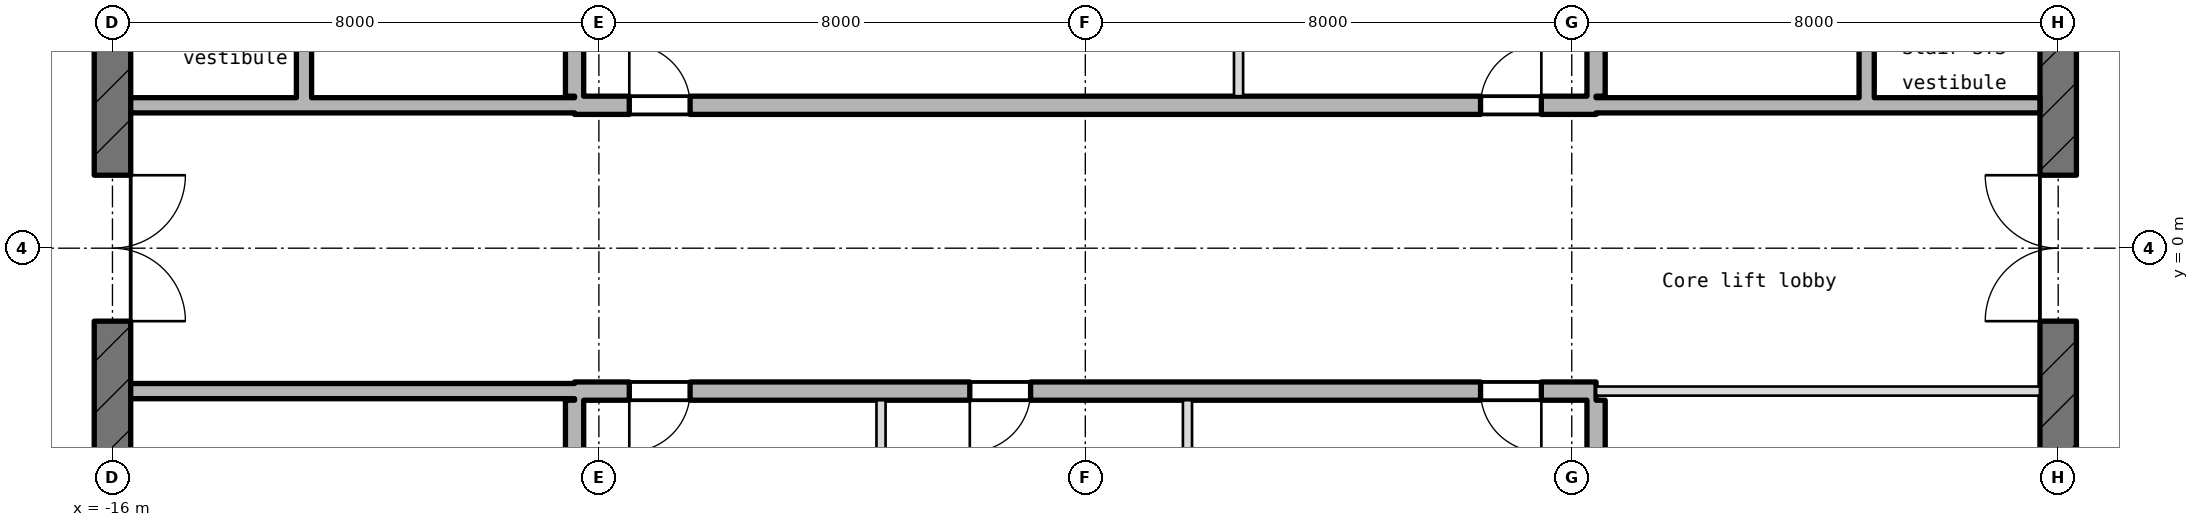
"""IFC4 building model, lengths in metres.
Left out: names, types, materials, properties, quantities, classifications, styles, units other than length and angle.
Written with IfcOpenShell. Run it as: python <this file> out.ifc"""

import sys

from ifc_helpers import new_model, si_unit, direction, frame, frame_2d, origin, place, context, subcontext, project, spatial, rectangle, extrude, element, fill, save


model = new_model("IFC4")
c1 = context("Model", 3, precision=1e-05, world=origin(), true_north=direction((0.0, 1.0)))
c2 = subcontext(c1, "Body", "Model", "MODEL_VIEW")
j1 = project(units=[si_unit("LENGTHUNIT", "METRE"), si_unit("PLANEANGLEUNIT", "RADIAN")], contexts=[c1])
p1 = place(None, origin())
s1 = spatial("IfcSite", under=j1, at=p1, CompositionType="ELEMENT")
p2 = place(p1, origin())
s2 = spatial("IfcBuilding", under=s1, at=p2, CompositionType="ELEMENT")
p3 = place(p2, frame((0.0, 0.0, 418.55)))
s3 = spatial("IfcBuildingStorey", under=s2, at=p3, CompositionType="ELEMENT", Elevation=418.55)
p4 = place(p3, frame((16.0, -10.124, -0.2), z_axis=(0.0, 0.0, 1.0), x_axis=(0.0, 1.0, 0.0)))
e1 = element("IfcWall", 1, at=p4, inside=s3, PredefinedType="SHEAR", context=c2, shape_type="SweptSolid", body=[
    extrude(rectangle(XDim=20.249, YDim=0.6, at=frame_2d((10.124, 0.0))), origin(), (0.0, 0.0, 1.0), 4.9),
])
p5 = place(p4, frame((8.924, 0.0, 0.2)))
e2 = element("IfcOpeningElement", 2, at=p5, cuts=e1, PredefinedType="OPENING", context=c2, shape_type="SweptSolid", body=[
    extrude(rectangle(XDim=2.4, YDim=2.1, at=frame_2d((1.2, 1.05))), frame((0.0, 0.31, 0.0), z_axis=(0.0, -1.0, 0.0), x_axis=(1.0, 0.0, 0.0)), (0.0, 0.0, 1.0), 0.62),
])
p6 = place(p4, frame((13.524, 0.0, 0.2)))
e3 = element("IfcOpeningElement", 3, at=p6, cuts=e1, PredefinedType="OPENING", context=c2, shape_type="SweptSolid", body=[
    extrude(rectangle(XDim=1.2, YDim=2.1, at=frame_2d((0.6, 1.05))), frame((0.0, 0.31, 0.0), z_axis=(0.0, -1.0, 0.0), x_axis=(1.0, 0.0, 0.0)), (0.0, 0.0, 1.0), 0.62),
])
p7 = place(p4, frame((2.4, 0.0, 0.2)))
e4 = element("IfcOpeningElement", 4, at=p7, cuts=e1, PredefinedType="OPENING", context=c2, shape_type="SweptSolid", body=[
    extrude(rectangle(XDim=1.2, YDim=2.1, at=frame_2d((0.6, 1.05))), frame((0.0, 0.31, 0.0), z_axis=(0.0, -1.0, 0.0), x_axis=(1.0, 0.0, 0.0)), (0.0, 0.0, 1.0), 0.62),
])
p8 = place(p3, frame((-16.0, 10.124, -0.2), z_axis=(0.0, 0.0, 1.0), x_axis=(0.0, -1.0, 0.0)))
e5 = element("IfcWall", 5, at=p8, inside=s3, PredefinedType="SHEAR", context=c2, shape_type="SweptSolid", body=[
    extrude(rectangle(XDim=20.249, YDim=0.6, at=frame_2d((10.124, 0.0))), origin(), (0.0, 0.0, 1.0), 4.9),
])
p9 = place(p8, frame((8.924, 0.0, 0.2)))
e6 = element("IfcOpeningElement", 6, at=p9, cuts=e5, PredefinedType="OPENING", context=c2, shape_type="SweptSolid", body=[
    extrude(rectangle(XDim=2.4, YDim=2.1, at=frame_2d((1.2, 1.05))), frame((0.0, 0.31, 0.0), z_axis=(0.0, -1.0, 0.0), x_axis=(1.0, 0.0, 0.0)), (0.0, 0.0, 1.0), 0.62),
])
p10 = place(p8, frame((5.524, 0.0, 0.2)))
e7 = element("IfcOpeningElement", 7, at=p10, cuts=e5, PredefinedType="OPENING", context=c2, shape_type="SweptSolid", body=[
    extrude(rectangle(XDim=1.2, YDim=2.1, at=frame_2d((0.6, 1.05))), frame((0.0, 0.31, 0.0), z_axis=(0.0, -1.0, 0.0), x_axis=(1.0, 0.0, 0.0)), (0.0, 0.0, 1.0), 0.62),
])
p11 = place(p3, frame((-15.7, -2.35, 0.0), z_axis=(0.0, 0.0, 1.0), x_axis=(1.0, 0.0, 0.0)))
e8 = element("IfcWall", 8, at=p11, inside=s3, PredefinedType="STANDARD", context=c2, shape_type="SweptSolid", body=[
    extrude(rectangle(XDim=7.3, YDim=0.25, at=frame_2d((3.65, 0.0))), origin(), (0.0, 0.0, 1.0), 4.7),
])
p12 = place(p3, frame((-8.4, -2.35, -0.2), z_axis=(0.0, 0.0, 1.0), x_axis=(1.0, 0.0, 0.0)))
e9 = element("IfcWall", 9, at=p12, inside=s3, PredefinedType="SHEAR", context=c2, shape_type="SweptSolid", body=[
    extrude(rectangle(XDim=16.8, YDim=0.3, at=frame_2d((8.4, 0.0))), origin(), (0.0, 0.0, 1.0), 4.9),
])
p13 = place(p12, frame((0.9, 0.0, 0.2)))
e10 = element("IfcOpeningElement", 10, at=p13, cuts=e9, PredefinedType="OPENING", context=c2, shape_type="SweptSolid", body=[
    extrude(rectangle(XDim=1.0, YDim=2.1, at=frame_2d((0.5, 1.05))), frame((0.0, 0.16, 0.0), z_axis=(0.0, -1.0, 0.0), x_axis=(1.0, 0.0, 0.0)), (0.0, 0.0, 1.0), 0.32),
])
p14 = place(p12, frame((6.5, 0.0, 0.2)))
e11 = element("IfcOpeningElement", 11, at=p14, cuts=e9, PredefinedType="OPENING", context=c2, shape_type="SweptSolid", body=[
    extrude(rectangle(XDim=1.0, YDim=2.1, at=frame_2d((0.5, 1.05))), frame((0.0, 0.16, 0.0), z_axis=(0.0, -1.0, 0.0), x_axis=(1.0, 0.0, 0.0)), (0.0, 0.0, 1.0), 0.32),
])
p15 = place(p12, frame((14.9, 0.0, 0.2)))
e12 = element("IfcOpeningElement", 12, at=p15, cuts=e9, PredefinedType="OPENING", context=c2, shape_type="SweptSolid", body=[
    extrude(rectangle(XDim=1.0, YDim=2.1, at=frame_2d((0.5, 1.05))), frame((0.0, 0.16, 0.0), z_axis=(0.0, -1.0, 0.0), x_axis=(1.0, 0.0, 0.0)), (0.0, 0.0, 1.0), 0.32),
])
p16 = place(p3, frame((8.4, -2.35, 0.0), z_axis=(0.0, 0.0, 1.0), x_axis=(1.0, 0.0, 0.0)))
e13 = element("IfcWall", 13, at=p16, inside=s3, PredefinedType="PARTITIONING", context=c2, shape_type="SweptSolid", body=[
    extrude(rectangle(XDim=7.3, YDim=0.15, at=frame_2d((3.65, 0.0))), origin(), (0.0, 0.0, 1.0), 4.7),
])
p17 = place(p3, frame((-15.7, 2.35, 0.0), z_axis=(0.0, 0.0, 1.0), x_axis=(1.0, 0.0, 0.0)))
e14 = element("IfcWall", 14, at=p17, inside=s3, PredefinedType="STANDARD", context=c2, shape_type="SweptSolid", body=[
    extrude(rectangle(XDim=7.3, YDim=0.25, at=frame_2d((3.65, 0.0))), origin(), (0.0, 0.0, 1.0), 4.7),
])
p18 = place(p3, frame((-8.4, 2.35, -0.2), z_axis=(0.0, 0.0, 1.0), x_axis=(1.0, 0.0, 0.0)))
e15 = element("IfcWall", 15, at=p18, inside=s3, PredefinedType="SHEAR", context=c2, shape_type="SweptSolid", body=[
    extrude(rectangle(XDim=16.8, YDim=0.3, at=frame_2d((8.4, 0.0))), origin(), (0.0, 0.0, 1.0), 4.9),
])
p19 = place(p18, frame((0.9, 0.0, 0.2)))
e16 = element("IfcOpeningElement", 16, at=p19, cuts=e15, PredefinedType="OPENING", context=c2, shape_type="SweptSolid", body=[
    extrude(rectangle(XDim=1.0, YDim=2.1, at=frame_2d((0.5, 1.05))), frame((0.0, 0.16, 0.0), z_axis=(0.0, -1.0, 0.0), x_axis=(1.0, 0.0, 0.0)), (0.0, 0.0, 1.0), 0.32),
])
p20 = place(p18, frame((14.9, 0.0, 0.2)))
e17 = element("IfcOpeningElement", 17, at=p20, cuts=e15, PredefinedType="OPENING", context=c2, shape_type="SweptSolid", body=[
    extrude(rectangle(XDim=1.0, YDim=2.1, at=frame_2d((0.5, 1.05))), frame((0.0, 0.16, 0.0), z_axis=(0.0, -1.0, 0.0), x_axis=(1.0, 0.0, 0.0)), (0.0, 0.0, 1.0), 0.32),
])
p21 = place(p3, frame((8.4, 2.35, 0.0), z_axis=(0.0, 0.0, 1.0), x_axis=(1.0, 0.0, 0.0)))
e18 = element("IfcWall", 18, at=p21, inside=s3, PredefinedType="STANDARD", context=c2, shape_type="SweptSolid", body=[
    extrude(rectangle(XDim=7.3, YDim=0.25, at=frame_2d((3.65, 0.0))), origin(), (0.0, 0.0, 1.0), 4.7),
])
p22 = place(p3, frame((-12.85, 2.475, 0.0), z_axis=(0.0, 0.0, 1.0), x_axis=(0.0, 1.0, 0.0)))
e19 = element("IfcWall", 19, at=p22, inside=s3, PredefinedType="STANDARD", context=c2, shape_type="SweptSolid", body=[
    extrude(rectangle(XDim=3.05, YDim=0.25, at=frame_2d((1.525, 0.0))), origin(), (0.0, 0.0, 1.0), 4.7),
])
p23 = place(p3, frame((-8.4, -8.75, -0.2), z_axis=(0.0, 0.0, 1.0), x_axis=(0.0, 1.0, 0.0)))
e20 = element("IfcWall", 20, at=p23, inside=s3, PredefinedType="SHEAR", context=c2, shape_type="SweptSolid", body=[
    extrude(rectangle(XDim=6.25, YDim=0.3, at=frame_2d((3.125, 0.0))), origin(), (0.0, 0.0, 1.0), 4.9),
])
p24 = place(p3, frame((-8.4, 2.5, -0.2), z_axis=(0.0, 0.0, 1.0), x_axis=(0.0, 1.0, 0.0)))
e21 = element("IfcWall", 21, at=p24, inside=s3, PredefinedType="SHEAR", context=c2, shape_type="SweptSolid", body=[
    extrude(rectangle(XDim=5.85, YDim=0.3, at=frame_2d((2.925, 0.0))), origin(), (0.0, 0.0, 1.0), 4.9),
])
for number, where, z_axis, x_axis in (
    (22, (-3.36, -5.24, 0.0), (0.0, 0.0, 1.0), (0.0, 1.0, 0.0)),
    (23, (1.68, -5.24, 0.0), (0.0, 0.0, 1.0), (0.0, 1.0, 0.0)),
):
    element("IfcWall", number, at=place(p3, frame(where, z_axis=z_axis, x_axis=x_axis)), inside=s3, PredefinedType="PARTITIONING", context=c2, shape_type="SweptSolid", body=[
        extrude(rectangle(XDim=2.74, YDim=0.15, at=frame_2d((1.37, 0.0))), origin(), (0.0, 0.0, 1.0), 4.7),
    ])
p25 = place(p3, frame((2.52, 2.5, 0.0), z_axis=(0.0, 0.0, 1.0), x_axis=(0.0, 1.0, 0.0)))
e24 = element("IfcWall", 24, at=p25, inside=s3, PredefinedType="PARTITIONING", context=c2, shape_type="SweptSolid", body=[
    extrude(rectangle(XDim=2.775, YDim=0.15, at=frame_2d((1.387, 0.0))), origin(), (0.0, 0.0, 1.0), 4.7),
])
for number, where, z_axis, x_axis in (
    (25, (8.4, -8.35, -0.2), (0.0, 0.0, 1.0), (0.0, 1.0, 0.0)),
    (26, (8.4, 2.5, -0.2), (0.0, 0.0, 1.0), (0.0, 1.0, 0.0)),
):
    element("IfcWall", number, at=place(p3, frame(where, z_axis=z_axis, x_axis=x_axis)), inside=s3, PredefinedType="SHEAR", context=c2, shape_type="SweptSolid", body=[
        extrude(rectangle(XDim=5.85, YDim=0.3, at=frame_2d((2.925, 0.0))), origin(), (0.0, 0.0, 1.0), 4.9),
    ])
p26 = place(p3, frame((12.85, 2.475, 0.0), z_axis=(0.0, 0.0, 1.0), x_axis=(0.0, 1.0, 0.0)))
e27 = element("IfcWall", 27, at=p26, inside=s3, PredefinedType="STANDARD", context=c2, shape_type="SweptSolid", body=[
    extrude(rectangle(XDim=3.05, YDim=0.25, at=frame_2d((1.525, 0.0))), origin(), (0.0, 0.0, 1.0), 4.7),
])
p27 = place(p9, origin())
e28 = element("IfcDoor", 28, at=p27, inside=s3, OperationType="DOUBLE_DOOR_SINGLE_SWING", PredefinedType="DOOR", context=c2, shape_type="SweptSolid", body=[
    extrude(rectangle(XDim=2.4, YDim=2.1, at=frame_2d((1.2, 1.05))), frame((0.0, 0.025, 0.0), z_axis=(0.0, -1.0, 0.0), x_axis=(1.0, 0.0, 0.0)), (0.0, 0.0, 1.0), 0.05),
])
fill(e6, e28)
p28 = place(p5, origin())
e29 = element("IfcDoor", 29, at=p28, inside=s3, OperationType="DOUBLE_DOOR_SINGLE_SWING", PredefinedType="DOOR", context=c2, shape_type="SweptSolid", body=[
    extrude(rectangle(XDim=2.4, YDim=2.1, at=frame_2d((1.2, 1.05))), frame((0.0, 0.025, 0.0), z_axis=(0.0, -1.0, 0.0), x_axis=(1.0, 0.0, 0.0)), (0.0, 0.0, 1.0), 0.05),
])
fill(e2, e29)
p29 = place(p19, origin())
e30 = element("IfcDoor", 30, at=p29, inside=s3, OperationType="SINGLE_SWING_RIGHT", PredefinedType="DOOR", context=c2, shape_type="SweptSolid", body=[
    extrude(rectangle(XDim=1.0, YDim=2.1, at=frame_2d((0.5, 1.05))), frame((0.0, 0.025, 0.0), z_axis=(0.0, -1.0, 0.0), x_axis=(1.0, 0.0, 0.0)), (0.0, 0.0, 1.0), 0.05),
])
fill(e16, e30)
p30 = place(p20, origin())
e31 = element("IfcDoor", 31, at=p30, inside=s3, OperationType="SINGLE_SWING_RIGHT", PredefinedType="DOOR", context=c2, shape_type="SweptSolid", body=[
    extrude(rectangle(XDim=1.0, YDim=2.1, at=frame_2d((0.5, 1.05))), frame((0.0, 0.025, 0.0), z_axis=(0.0, -1.0, 0.0), x_axis=(1.0, 0.0, 0.0)), (0.0, 0.0, 1.0), 0.05),
])
fill(e17, e31)
p31 = place(p13, frame((1.0, 0.0, 0.0), z_axis=(0.0, 0.0, 1.0), x_axis=(-1.0, 0.0, 0.0)))
e32 = element("IfcDoor", 32, at=p31, inside=s3, OperationType="SINGLE_SWING_LEFT", PredefinedType="DOOR", context=c2, shape_type="SweptSolid", body=[
    extrude(rectangle(XDim=1.0, YDim=2.1, at=frame_2d((0.5, 1.05))), frame((0.0, 0.025, 0.0), z_axis=(0.0, -1.0, 0.0), x_axis=(1.0, 0.0, 0.0)), (0.0, 0.0, 1.0), 0.05),
])
fill(e10, e32)
p32 = place(p14, frame((1.0, 0.0, 0.0), z_axis=(0.0, 0.0, 1.0), x_axis=(-1.0, 0.0, 0.0)))
e33 = element("IfcDoor", 33, at=p32, inside=s3, OperationType="SINGLE_SWING_LEFT", PredefinedType="DOOR", context=c2, shape_type="SweptSolid", body=[
    extrude(rectangle(XDim=1.0, YDim=2.1, at=frame_2d((0.5, 1.05))), frame((0.0, 0.025, 0.0), z_axis=(0.0, -1.0, 0.0), x_axis=(1.0, 0.0, 0.0)), (0.0, 0.0, 1.0), 0.05),
])
fill(e11, e33)
p33 = place(p15, frame((1.0, 0.0, 0.0), z_axis=(0.0, 0.0, 1.0), x_axis=(-1.0, 0.0, 0.0)))
e34 = element("IfcDoor", 34, at=p33, inside=s3, OperationType="SINGLE_SWING_LEFT", PredefinedType="DOOR", context=c2, shape_type="SweptSolid", body=[
    extrude(rectangle(XDim=1.0, YDim=2.1, at=frame_2d((0.5, 1.05))), frame((0.0, 0.025, 0.0), z_axis=(0.0, -1.0, 0.0), x_axis=(1.0, 0.0, 0.0)), (0.0, 0.0, 1.0), 0.05),
])
fill(e12, e34)
save(model, sys.argv[1])
